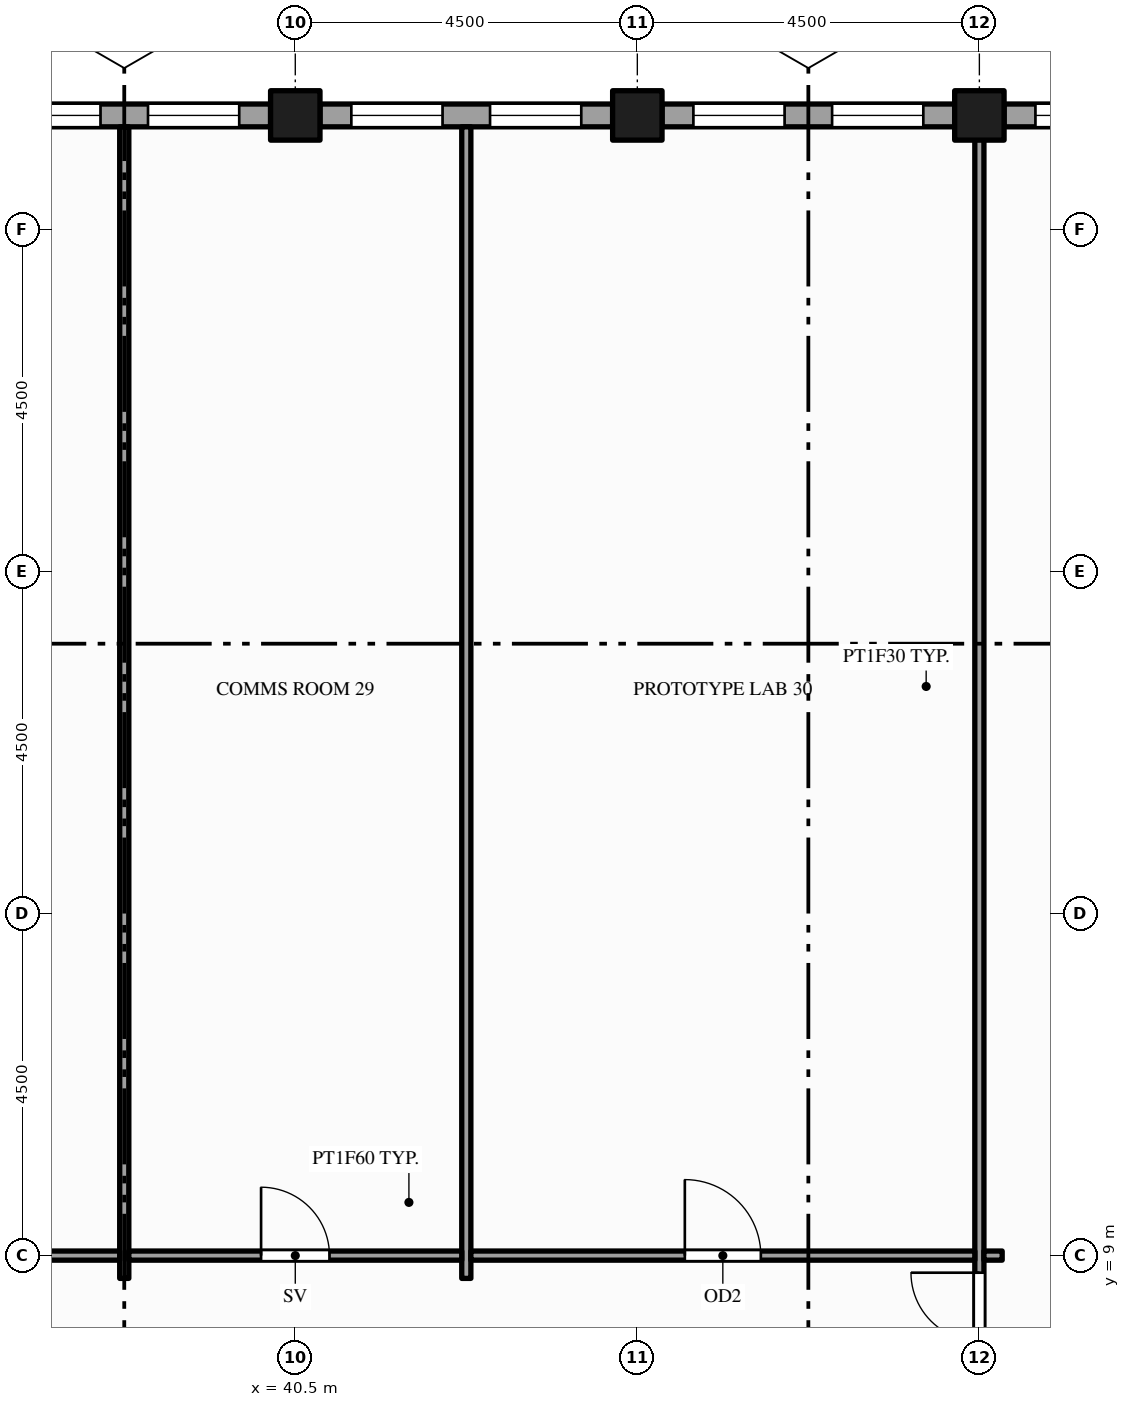
"""IFC4 building model, lengths in metres.
Left out: names, types, materials, properties, quantities, classifications, styles, units other than length and angle.
Written with IfcOpenShell. Run it as: python <this file> out.ifc"""

import sys

from ifc_helpers import new_model, si_unit, direction, frame, frame_2d, origin, origin_2d, place, context, subcontext, project, spatial, rectangle, hollow_rectangle, extrude, element, fill, save


model = new_model("IFC4")
c1 = context("Model", 3, precision=1e-05, world=origin(), true_north=direction((0.0, 1.0)))
c2 = subcontext(c1, "Body", "Model", "MODEL_VIEW")
j1 = project(units=[si_unit("LENGTHUNIT", "METRE"), si_unit("PLANEANGLEUNIT", "RADIAN")], contexts=[c1])
p1 = place(None, origin())
s1 = spatial("IfcSite", under=j1, at=p1, CompositionType="ELEMENT")
p2 = place(p1, origin())
s2 = spatial("IfcBuilding", under=s1, at=p2, CompositionType="ELEMENT")
p3 = place(p2, frame((0.0, 0.0, 273.0)))
s3 = spatial("IfcBuildingStorey", under=s2, at=p3, CompositionType="ELEMENT", Elevation=273.0)
for number, where, z_axis, x_axis in (
    (1, (40.5, 24.0, -0.15), (0.0, 0.0, 1.0), (1.0, 0.0, 0.0)),
    (2, (45.0, 24.0, -0.15), (0.0, 0.0, 1.0), (1.0, 0.0, 0.0)),
    (3, (49.5, 24.0, -0.15), (0.0, 0.0, 1.0), (1.0, 0.0, 0.0)),
):
    element("IfcColumn", number, at=place(p3, frame(where, z_axis=z_axis, x_axis=x_axis)), inside=s3, PredefinedType="COLUMN", context=c2, shape_type="SweptSolid", body=[
        extrude(hollow_rectangle(XDim=0.65, YDim=0.65, WallThickness=0.032, at=origin_2d()), origin(), (0.0, 0.0, 1.0), 4.0),
    ])
p4 = place(p3, frame((53.675, 24.0, 0.0), z_axis=(0.0, 0.0, 1.0), x_axis=(-1.0, 0.0, 0.0)))
e4 = element("IfcWall", 4, at=p4, inside=s3, PredefinedType="STANDARD", context=c2, shape_type="SweptSolid", body=[
    extrude(rectangle(XDim=3.85, YDim=0.3, at=frame_2d((1.925, 0.0))), origin(), (0.0, 0.0, 1.0), 2.87),
])
p5 = place(p4, frame((0.413, 0.0, 0.9)))
e5 = element("IfcOpeningElement", 5, at=p5, cuts=e4, PredefinedType="OPENING", context=c2, shape_type="SweptSolid", body=[
    extrude(rectangle(XDim=1.2, YDim=1.75, at=frame_2d((0.6, 0.875))), frame((0.0, 0.16, 0.0), z_axis=(0.0, -1.0, 0.0), x_axis=(1.0, 0.0, 0.0)), (0.0, 0.0, 1.0), 0.32),
])
p6 = place(p4, frame((2.238, 0.0, 0.9)))
e6 = element("IfcOpeningElement", 6, at=p6, cuts=e4, PredefinedType="OPENING", context=c2, shape_type="SweptSolid", body=[
    extrude(rectangle(XDim=1.2, YDim=1.75, at=frame_2d((0.6, 0.875))), frame((0.0, 0.16, 0.0), z_axis=(0.0, -1.0, 0.0), x_axis=(1.0, 0.0, 0.0)), (0.0, 0.0, 1.0), 0.32),
])
p7 = place(p3, frame((49.175, 24.0, 0.0), z_axis=(0.0, 0.0, 1.0), x_axis=(-1.0, 0.0, 0.0)))
e7 = element("IfcWall", 7, at=p7, inside=s3, PredefinedType="STANDARD", context=c2, shape_type="SweptSolid", body=[
    extrude(rectangle(XDim=3.85, YDim=0.3, at=frame_2d((1.925, 0.0))), origin(), (0.0, 0.0, 1.0), 2.87),
])
p8 = place(p7, frame((0.413, 0.0, 0.9)))
e8 = element("IfcOpeningElement", 8, at=p8, cuts=e7, PredefinedType="OPENING", context=c2, shape_type="SweptSolid", body=[
    extrude(rectangle(XDim=1.2, YDim=1.75, at=frame_2d((0.6, 0.875))), frame((0.0, 0.16, 0.0), z_axis=(0.0, -1.0, 0.0), x_axis=(1.0, 0.0, 0.0)), (0.0, 0.0, 1.0), 0.32),
])
p9 = place(p7, frame((2.238, 0.0, 0.9)))
e9 = element("IfcOpeningElement", 9, at=p9, cuts=e7, PredefinedType="OPENING", context=c2, shape_type="SweptSolid", body=[
    extrude(rectangle(XDim=1.2, YDim=1.75, at=frame_2d((0.6, 0.875))), frame((0.0, 0.16, 0.0), z_axis=(0.0, -1.0, 0.0), x_axis=(1.0, 0.0, 0.0)), (0.0, 0.0, 1.0), 0.32),
])
p10 = place(p3, frame((44.675, 24.0, 0.0), z_axis=(0.0, 0.0, 1.0), x_axis=(-1.0, 0.0, 0.0)))
e10 = element("IfcWall", 10, at=p10, inside=s3, PredefinedType="STANDARD", context=c2, shape_type="SweptSolid", body=[
    extrude(rectangle(XDim=3.85, YDim=0.3, at=frame_2d((1.925, 0.0))), origin(), (0.0, 0.0, 1.0), 2.87),
])
p11 = place(p10, frame((0.413, 0.0, 0.9)))
e11 = element("IfcOpeningElement", 11, at=p11, cuts=e10, PredefinedType="OPENING", context=c2, shape_type="SweptSolid", body=[
    extrude(rectangle(XDim=1.2, YDim=1.75, at=frame_2d((0.6, 0.875))), frame((0.0, 0.16, 0.0), z_axis=(0.0, -1.0, 0.0), x_axis=(1.0, 0.0, 0.0)), (0.0, 0.0, 1.0), 0.32),
])
p12 = place(p10, frame((2.238, 0.0, 0.9)))
e12 = element("IfcOpeningElement", 12, at=p12, cuts=e10, PredefinedType="OPENING", context=c2, shape_type="SweptSolid", body=[
    extrude(rectangle(XDim=1.2, YDim=1.75, at=frame_2d((0.6, 0.875))), frame((0.0, 0.16, 0.0), z_axis=(0.0, -1.0, 0.0), x_axis=(1.0, 0.0, 0.0)), (0.0, 0.0, 1.0), 0.32),
])
p13 = place(p3, frame((40.175, 24.0, 0.0), z_axis=(0.0, 0.0, 1.0), x_axis=(-1.0, 0.0, 0.0)))
e13 = element("IfcWall", 13, at=p13, inside=s3, PredefinedType="STANDARD", context=c2, shape_type="SweptSolid", body=[
    extrude(rectangle(XDim=3.85, YDim=0.3, at=frame_2d((1.925, 0.0))), origin(), (0.0, 0.0, 1.0), 2.87),
])
p14 = place(p13, frame((0.413, 0.0, 0.9)))
e14 = element("IfcOpeningElement", 14, at=p14, cuts=e13, PredefinedType="OPENING", context=c2, shape_type="SweptSolid", body=[
    extrude(rectangle(XDim=1.2, YDim=1.75, at=frame_2d((0.6, 0.875))), frame((0.0, 0.16, 0.0), z_axis=(0.0, -1.0, 0.0), x_axis=(1.0, 0.0, 0.0)), (0.0, 0.0, 1.0), 0.32),
])
p15 = place(p13, frame((2.238, 0.0, 0.9)))
e15 = element("IfcOpeningElement", 15, at=p15, cuts=e13, PredefinedType="OPENING", context=c2, shape_type="SweptSolid", body=[
    extrude(rectangle(XDim=1.2, YDim=1.75, at=frame_2d((0.6, 0.875))), frame((0.0, 0.16, 0.0), z_axis=(0.0, -1.0, 0.0), x_axis=(1.0, 0.0, 0.0)), (0.0, 0.0, 1.0), 0.32),
])
for number, where, z_axis, x_axis in (
    (16, (38.25, 8.7, 0.0), (0.0, 0.0, 1.0), (0.0, 1.0, 0.0)),
    (17, (42.75, 8.7, 0.0), (0.0, 0.0, 1.0), (0.0, 1.0, 0.0)),
):
    element("IfcWall", number, at=place(p3, frame(where, z_axis=z_axis, x_axis=x_axis)), inside=s3, PredefinedType="PARTITIONING", context=c2, shape_type="SweptSolid", body=[
        extrude(rectangle(XDim=15.15, YDim=0.12, at=frame_2d((7.575, 0.0))), origin(), (0.0, 0.0, 1.0), 2.87),
    ])
p16 = place(p3, frame((49.5, 1.65, 0.0), z_axis=(0.0, 0.0, 1.0), x_axis=(0.0, 1.0, 0.0)))
e18 = element("IfcWall", 18, at=p16, inside=s3, PredefinedType="PARTITIONING", context=c2, shape_type="SweptSolid", body=[
    extrude(rectangle(XDim=22.2, YDim=0.12, at=frame_2d((11.1, 0.0))), origin(), (0.0, 0.0, 1.0), 2.87),
])
p17 = place(p16, frame((5.325, 0.0, 0.0)))
e19 = element("IfcOpeningElement", 19, at=p17, cuts=e18, PredefinedType="OPENING", context=c2, shape_type="SweptSolid", body=[
    extrude(rectangle(XDim=1.8, YDim=2.1, at=frame_2d((0.9, 1.05))), frame((0.0, 0.07, 0.0), z_axis=(0.0, -1.0, 0.0), x_axis=(1.0, 0.0, 0.0)), (0.0, 0.0, 1.0), 0.14),
])
p18 = place(p16, frame((0.54, 0.0, 0.0)))
e20 = element("IfcOpeningElement", 20, at=p18, cuts=e18, PredefinedType="OPENING", context=c2, shape_type="SweptSolid", body=[
    extrude(rectangle(XDim=0.9, YDim=2.1, at=frame_2d((0.45, 1.05))), frame((0.0, 0.07, 0.0), z_axis=(0.0, -1.0, 0.0), x_axis=(1.0, 0.0, 0.0)), (0.0, 0.0, 1.0), 0.14),
])
p19 = place(p16, frame((2.025, 0.0, 0.0)))
e21 = element("IfcOpeningElement", 21, at=p19, cuts=e18, PredefinedType="OPENING", context=c2, shape_type="SweptSolid", body=[
    extrude(rectangle(XDim=0.9, YDim=2.1, at=frame_2d((0.45, 1.05))), frame((0.0, 0.07, 0.0), z_axis=(0.0, -1.0, 0.0), x_axis=(1.0, 0.0, 0.0)), (0.0, 0.0, 1.0), 0.14),
])
p20 = place(p16, frame((3.51, 0.0, 0.0)))
e22 = element("IfcOpeningElement", 22, at=p20, cuts=e18, PredefinedType="OPENING", context=c2, shape_type="SweptSolid", body=[
    extrude(rectangle(XDim=1.0, YDim=2.1, at=frame_2d((0.5, 1.05))), frame((0.0, 0.07, 0.0), z_axis=(0.0, -1.0, 0.0), x_axis=(1.0, 0.0, 0.0)), (0.0, 0.0, 1.0), 0.14),
])
p21 = place(p3, frame((24.81, 9.0, 0.0), z_axis=(0.0, 0.0, 1.0), x_axis=(1.0, 0.0, 0.0)))
e23 = element("IfcWall", 23, at=p21, inside=s3, PredefinedType="PARTITIONING", context=c2, shape_type="SweptSolid", body=[
    extrude(rectangle(XDim=13.38, YDim=0.12, at=frame_2d((6.69, 0.0))), origin(), (0.0, 0.0, 1.0), 2.87),
])
p22 = place(p21, frame((5.79, 0.0, 0.0)))
e24 = element("IfcOpeningElement", 24, at=p22, cuts=e23, PredefinedType="OPENING", context=c2, shape_type="SweptSolid", body=[
    extrude(rectangle(XDim=1.8, YDim=2.1, at=frame_2d((0.9, 1.05))), frame((0.0, 0.07, 0.0), z_axis=(0.0, -1.0, 0.0), x_axis=(1.0, 0.0, 0.0)), (0.0, 0.0, 1.0), 0.14),
])
p23 = place(p3, frame((38.31, 9.0, 0.0), z_axis=(0.0, 0.0, 1.0), x_axis=(1.0, 0.0, 0.0)))
e25 = element("IfcWall", 25, at=p23, inside=s3, PredefinedType="PARTITIONING", context=c2, shape_type="SweptSolid", body=[
    extrude(rectangle(XDim=4.38, YDim=0.12, at=frame_2d((2.19, 0.0))), origin(), (0.0, 0.0, 1.0), 2.87),
])
p24 = place(p23, frame((1.74, 0.0, 0.0)))
e26 = element("IfcOpeningElement", 26, at=p24, cuts=e25, PredefinedType="OPENING", context=c2, shape_type="SweptSolid", body=[
    extrude(rectangle(XDim=0.9, YDim=2.1, at=frame_2d((0.45, 1.05))), frame((0.0, 0.07, 0.0), z_axis=(0.0, -1.0, 0.0), x_axis=(1.0, 0.0, 0.0)), (0.0, 0.0, 1.0), 0.14),
])
p25 = place(p3, frame((42.81, 9.0, 0.0), z_axis=(0.0, 0.0, 1.0), x_axis=(1.0, 0.0, 0.0)))
e27 = element("IfcWall", 27, at=p25, inside=s3, PredefinedType="PARTITIONING", context=c2, shape_type="SweptSolid", body=[
    extrude(rectangle(XDim=6.63, YDim=0.12, at=frame_2d((3.315, 0.0))), origin(), (0.0, 0.0, 1.0), 2.87),
])
p26 = place(p25, frame((2.815, 0.0, 0.0)))
e28 = element("IfcOpeningElement", 28, at=p26, cuts=e27, PredefinedType="OPENING", context=c2, shape_type="SweptSolid", body=[
    extrude(rectangle(XDim=1.0, YDim=2.1, at=frame_2d((0.5, 1.05))), frame((0.0, 0.07, 0.0), z_axis=(0.0, -1.0, 0.0), x_axis=(1.0, 0.0, 0.0)), (0.0, 0.0, 1.0), 0.14),
])
p27 = place(p3, frame((49.56, 9.0, 0.0), z_axis=(0.0, 0.0, 1.0), x_axis=(1.0, 0.0, 0.0)))
e29 = element("IfcWall", 29, at=p27, inside=s3, PredefinedType="PARTITIONING", context=c2, shape_type="SweptSolid", body=[
    extrude(rectangle(XDim=0.24, YDim=0.12, at=frame_2d((0.12, 0.0))), origin(), (0.0, 0.0, 1.0), 2.87),
])
p28 = place(p6, origin())
e30 = element("IfcWindow", 30, at=p28, inside=s3, PartitioningType="SINGLE_PANEL", PredefinedType="WINDOW", context=c2, shape_type="SweptSolid", body=[
    extrude(rectangle(XDim=1.2, YDim=1.75, at=frame_2d((0.6, 0.875))), frame((0.0, 0.03, 0.0), z_axis=(0.0, -1.0, 0.0), x_axis=(1.0, 0.0, 0.0)), (0.0, 0.0, 1.0), 0.06),
])
fill(e6, e30)
p29 = place(p8, origin())
e31 = element("IfcWindow", 31, at=p29, inside=s3, PartitioningType="SINGLE_PANEL", PredefinedType="WINDOW", context=c2, shape_type="SweptSolid", body=[
    extrude(rectangle(XDim=1.2, YDim=1.75, at=frame_2d((0.6, 0.875))), frame((0.0, 0.03, 0.0), z_axis=(0.0, -1.0, 0.0), x_axis=(1.0, 0.0, 0.0)), (0.0, 0.0, 1.0), 0.06),
])
fill(e8, e31)
p30 = place(p9, origin())
e32 = element("IfcWindow", 32, at=p30, inside=s3, PartitioningType="SINGLE_PANEL", PredefinedType="WINDOW", context=c2, shape_type="SweptSolid", body=[
    extrude(rectangle(XDim=1.2, YDim=1.75, at=frame_2d((0.6, 0.875))), frame((0.0, 0.03, 0.0), z_axis=(0.0, -1.0, 0.0), x_axis=(1.0, 0.0, 0.0)), (0.0, 0.0, 1.0), 0.06),
])
fill(e9, e32)
p31 = place(p11, origin())
e33 = element("IfcWindow", 33, at=p31, inside=s3, PartitioningType="SINGLE_PANEL", PredefinedType="WINDOW", context=c2, shape_type="SweptSolid", body=[
    extrude(rectangle(XDim=1.2, YDim=1.75, at=frame_2d((0.6, 0.875))), frame((0.0, 0.03, 0.0), z_axis=(0.0, -1.0, 0.0), x_axis=(1.0, 0.0, 0.0)), (0.0, 0.0, 1.0), 0.06),
])
fill(e11, e33)
p32 = place(p12, origin())
e34 = element("IfcWindow", 34, at=p32, inside=s3, PartitioningType="SINGLE_PANEL", PredefinedType="WINDOW", context=c2, shape_type="SweptSolid", body=[
    extrude(rectangle(XDim=1.2, YDim=1.75, at=frame_2d((0.6, 0.875))), frame((0.0, 0.03, 0.0), z_axis=(0.0, -1.0, 0.0), x_axis=(1.0, 0.0, 0.0)), (0.0, 0.0, 1.0), 0.06),
])
fill(e12, e34)
p33 = place(p14, origin())
e35 = element("IfcWindow", 35, at=p33, inside=s3, PartitioningType="SINGLE_PANEL", PredefinedType="WINDOW", context=c2, shape_type="SweptSolid", body=[
    extrude(rectangle(XDim=1.2, YDim=1.75, at=frame_2d((0.6, 0.875))), frame((0.0, 0.03, 0.0), z_axis=(0.0, -1.0, 0.0), x_axis=(1.0, 0.0, 0.0)), (0.0, 0.0, 1.0), 0.06),
])
fill(e14, e35)
p34 = place(p15, origin())
e36 = element("IfcWindow", 36, at=p34, inside=s3, PartitioningType="SINGLE_PANEL", PredefinedType="WINDOW", context=c2, shape_type="SweptSolid", body=[
    extrude(rectangle(XDim=1.2, YDim=1.75, at=frame_2d((0.6, 0.875))), frame((0.0, 0.03, 0.0), z_axis=(0.0, -1.0, 0.0), x_axis=(1.0, 0.0, 0.0)), (0.0, 0.0, 1.0), 0.06),
])
fill(e15, e36)
p35 = place(p17, origin())
e37 = element("IfcDoor", 37, at=p35, inside=s3, OperationType="DOUBLE_DOOR_SINGLE_SWING", PredefinedType="DOOR", context=c2, shape_type="SweptSolid", body=[
    extrude(rectangle(XDim=1.8, YDim=2.1, at=frame_2d((0.9, 1.05))), frame((0.0, 0.025, 0.0), z_axis=(0.0, -1.0, 0.0), x_axis=(1.0, 0.0, 0.0)), (0.0, 0.0, 1.0), 0.05),
])
fill(e19, e37)
p36 = place(p24, origin())
e38 = element("IfcDoor", 38, at=p36, inside=s3, OperationType="SINGLE_SWING_LEFT", PredefinedType="DOOR", context=c2, shape_type="SweptSolid", body=[
    extrude(rectangle(XDim=0.9, YDim=2.1, at=frame_2d((0.45, 1.05))), frame((0.0, 0.025, 0.0), z_axis=(0.0, -1.0, 0.0), x_axis=(1.0, 0.0, 0.0)), (0.0, 0.0, 1.0), 0.05),
])
fill(e26, e38)
p37 = place(p26, origin())
e39 = element("IfcDoor", 39, at=p37, inside=s3, OperationType="SINGLE_SWING_LEFT", PredefinedType="DOOR", context=c2, shape_type="SweptSolid", body=[
    extrude(rectangle(XDim=1.0, YDim=2.1, at=frame_2d((0.5, 1.05))), frame((0.0, 0.025, 0.0), z_axis=(0.0, -1.0, 0.0), x_axis=(1.0, 0.0, 0.0)), (0.0, 0.0, 1.0), 0.05),
])
fill(e28, e39)
save(model, sys.argv[1])
